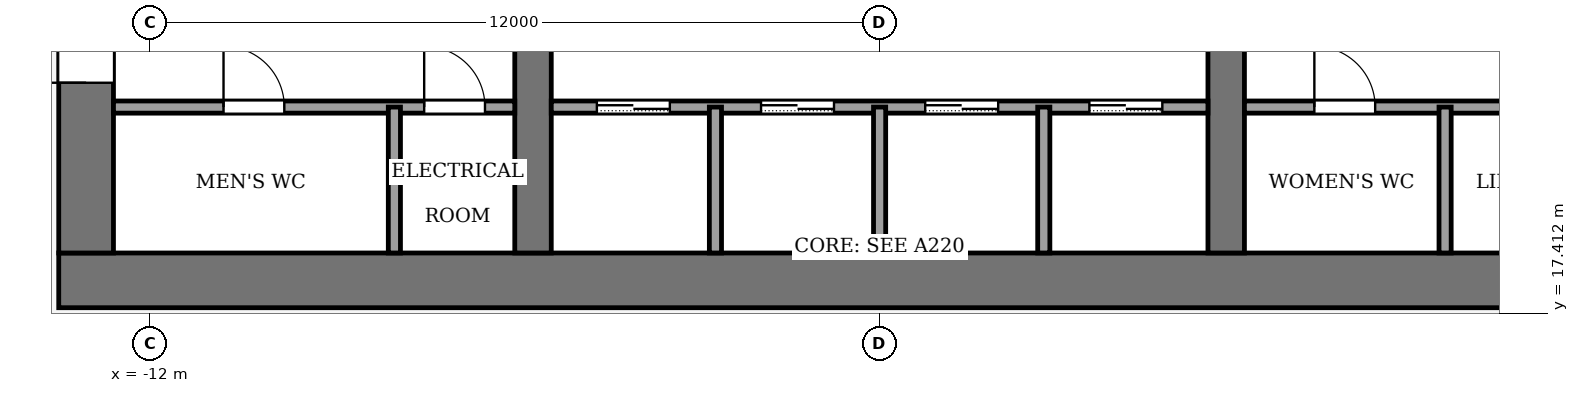
"""IFC4 building model, lengths in metres.
Left out: names, types, materials, properties, quantities, classifications, styles, units other than length and angle.
Written with IfcOpenShell. Run it as: python <this file> out.ifc"""

import sys

from ifc_helpers import new_model, si_unit, direction, frame, frame_2d, origin, place, context, subcontext, project, spatial, rectangle, extrude, element, fill, save


model = new_model("IFC4")
c1 = context("Model", 3, precision=1e-05, world=origin(), true_north=direction((0.0, 1.0)))
c2 = subcontext(c1, "Body", "Model", "MODEL_VIEW")
j1 = project(units=[si_unit("LENGTHUNIT", "METRE"), si_unit("PLANEANGLEUNIT", "RADIAN")], contexts=[c1])
p1 = place(None, origin())
s1 = spatial("IfcSite", under=j1, at=p1, CompositionType="ELEMENT")
p2 = place(p1, origin())
s2 = spatial("IfcBuilding", under=s1, at=p2, CompositionType="ELEMENT")
p3 = place(p2, frame((0.0, 0.0, 190.0)))
s3 = spatial("IfcBuildingStorey", under=s2, at=p3, CompositionType="ELEMENT", Elevation=190.0)
p4 = place(p3, frame((-13.5, 17.95, -0.13), z_axis=(0.0, 0.0, 1.0), x_axis=(1.0, 0.0, 0.0)))
e1 = element("IfcWall", 1, at=p4, inside=s3, PredefinedType="SHEAR", context=c2, shape_type="SweptSolid", body=[
    extrude(rectangle(XDim=27.0, YDim=0.9, at=frame_2d((13.5, 0.0))), origin(), (0.0, 0.0, 1.0), 4.0),
])
p5 = place(p3, frame((-13.05, 18.4, -0.13), z_axis=(0.0, 0.0, 1.0), x_axis=(0.0, 1.0, 0.0)))
e2 = element("IfcWall", 2, at=p5, inside=s3, PredefinedType="SHEAR", context=c2, shape_type="SweptSolid", body=[
    extrude(rectangle(XDim=19.2, YDim=0.9, at=frame_2d((9.6, 0.0))), origin(), (0.0, 0.0, 1.0), 4.0),
])
p6 = place(p5, frame((2.8, 0.0, 0.13)))
e3 = element("IfcOpeningElement", 3, at=p6, cuts=e2, PredefinedType="OPENING", context=c2, shape_type="SweptSolid", body=[
    extrude(rectangle(XDim=2.4, YDim=2.4, at=frame_2d((1.2, 1.2))), frame((0.0, 0.46, 0.0), z_axis=(0.0, -1.0, 0.0), x_axis=(1.0, 0.0, 0.0)), (0.0, 0.0, 1.0), 0.92),
])
p7 = place(p5, frame((13.4, 0.0, 0.13)))
e4 = element("IfcOpeningElement", 4, at=p7, cuts=e2, PredefinedType="OPENING", context=c2, shape_type="SweptSolid", body=[
    extrude(rectangle(XDim=1.4, YDim=2.2, at=frame_2d((0.7, 1.1))), frame((0.0, 0.46, 0.0), z_axis=(0.0, -1.0, 0.0), x_axis=(1.0, 0.0, 0.0)), (0.0, 0.0, 1.0), 0.92),
])
p8 = place(p3, frame((-5.7, 18.4, -0.13), z_axis=(0.0, 0.0, 1.0), x_axis=(0.0, 1.0, 0.0)))
e5 = element("IfcWall", 5, at=p8, inside=s3, PredefinedType="SHEAR", context=c2, shape_type="SweptSolid", body=[
    extrude(rectangle(XDim=19.2, YDim=0.6, at=frame_2d((9.6, 0.0))), origin(), (0.0, 0.0, 1.0), 4.0),
])
p9 = place(p8, frame((8.35, 0.0, 0.13)))
e6 = element("IfcOpeningElement", 6, at=p9, cuts=e5, PredefinedType="OPENING", context=c2, shape_type="SweptSolid", body=[
    extrude(rectangle(XDim=0.9, YDim=2.1, at=frame_2d((0.45, 1.05))), frame((0.0, 0.31, 0.0), z_axis=(0.0, -1.0, 0.0), x_axis=(1.0, 0.0, 0.0)), (0.0, 0.0, 1.0), 0.62),
])
p10 = place(p3, frame((5.7, 18.4, -0.13), z_axis=(0.0, 0.0, 1.0), x_axis=(0.0, 1.0, 0.0)))
e7 = element("IfcWall", 7, at=p10, inside=s3, PredefinedType="SHEAR", context=c2, shape_type="SweptSolid", body=[
    extrude(rectangle(XDim=19.2, YDim=0.6, at=frame_2d((9.6, 0.0))), origin(), (0.0, 0.0, 1.0), 4.0),
])
p11 = place(p10, frame((8.35, 0.0, 0.13)))
e8 = element("IfcOpeningElement", 8, at=p11, cuts=e7, PredefinedType="OPENING", context=c2, shape_type="SweptSolid", body=[
    extrude(rectangle(XDim=0.9, YDim=2.1, at=frame_2d((0.45, 1.05))), frame((0.0, 0.31, 0.0), z_axis=(0.0, -1.0, 0.0), x_axis=(1.0, 0.0, 0.0)), (0.0, 0.0, 1.0), 0.62),
])
p12 = place(p10, frame((13.3, 0.0, 0.13)))
e9 = element("IfcOpeningElement", 9, at=p12, cuts=e7, PredefinedType="OPENING", context=c2, shape_type="SweptSolid", body=[
    extrude(rectangle(XDim=2.4, YDim=2.4, at=frame_2d((1.2, 1.2))), frame((0.0, 0.31, 0.0), z_axis=(0.0, -1.0, 0.0), x_axis=(1.0, 0.0, 0.0)), (0.0, 0.0, 1.0), 0.62),
])
p13 = place(p3, frame((-12.6, 20.8, 0.0), z_axis=(0.0, 0.0, 1.0), x_axis=(1.0, 0.0, 0.0)))
e10 = element("IfcWall", 10, at=p13, inside=s3, PredefinedType="PARTITIONING", context=c2, shape_type="SweptSolid", body=[
    extrude(rectangle(XDim=6.6, YDim=0.2, at=frame_2d((3.3, 0.0))), origin(), (0.0, 0.0, 1.0), 3.87),
])
p14 = place(p13, frame((1.81, 0.0, 0.0)))
e11 = element("IfcOpeningElement", 11, at=p14, cuts=e10, PredefinedType="OPENING", context=c2, shape_type="SweptSolid", body=[
    extrude(rectangle(XDim=1.0, YDim=2.1, at=frame_2d((0.5, 1.05))), frame((0.0, 0.11, 0.0), z_axis=(0.0, -1.0, 0.0), x_axis=(1.0, 0.0, 0.0)), (0.0, 0.0, 1.0), 0.22),
])
p15 = place(p13, frame((5.11, 0.0, 0.0)))
e12 = element("IfcOpeningElement", 12, at=p15, cuts=e10, PredefinedType="OPENING", context=c2, shape_type="SweptSolid", body=[
    extrude(rectangle(XDim=1.0, YDim=2.1, at=frame_2d((0.5, 1.05))), frame((0.0, 0.11, 0.0), z_axis=(0.0, -1.0, 0.0), x_axis=(1.0, 0.0, 0.0)), (0.0, 0.0, 1.0), 0.22),
])
p16 = place(p3, frame((-5.4, 20.8, 0.0), z_axis=(0.0, 0.0, 1.0), x_axis=(1.0, 0.0, 0.0)))
e13 = element("IfcWall", 13, at=p16, inside=s3, PredefinedType="PARTITIONING", context=c2, shape_type="SweptSolid", body=[
    extrude(rectangle(XDim=10.8, YDim=0.2, at=frame_2d((5.4, 0.0))), origin(), (0.0, 0.0, 1.0), 3.87),
])
p17 = place(p16, frame((0.75, 0.0, 0.0)))
e14 = element("IfcOpeningElement", 14, at=p17, cuts=e13, PredefinedType="OPENING", context=c2, shape_type="SweptSolid", body=[
    extrude(rectangle(XDim=1.2, YDim=2.2, at=frame_2d((0.6, 1.1))), frame((0.0, 0.11, 0.0), z_axis=(0.0, -1.0, 0.0), x_axis=(1.0, 0.0, 0.0)), (0.0, 0.0, 1.0), 0.22),
])
p18 = place(p16, frame((3.45, 0.0, 0.0)))
e15 = element("IfcOpeningElement", 15, at=p18, cuts=e13, PredefinedType="OPENING", context=c2, shape_type="SweptSolid", body=[
    extrude(rectangle(XDim=1.2, YDim=2.2, at=frame_2d((0.6, 1.1))), frame((0.0, 0.11, 0.0), z_axis=(0.0, -1.0, 0.0), x_axis=(1.0, 0.0, 0.0)), (0.0, 0.0, 1.0), 0.22),
])
p19 = place(p16, frame((6.15, 0.0, 0.0)))
e16 = element("IfcOpeningElement", 16, at=p19, cuts=e13, PredefinedType="OPENING", context=c2, shape_type="SweptSolid", body=[
    extrude(rectangle(XDim=1.2, YDim=2.2, at=frame_2d((0.6, 1.1))), frame((0.0, 0.11, 0.0), z_axis=(0.0, -1.0, 0.0), x_axis=(1.0, 0.0, 0.0)), (0.0, 0.0, 1.0), 0.22),
])
p20 = place(p16, frame((8.85, 0.0, 0.0)))
e17 = element("IfcOpeningElement", 17, at=p20, cuts=e13, PredefinedType="OPENING", context=c2, shape_type="SweptSolid", body=[
    extrude(rectangle(XDim=1.2, YDim=2.2, at=frame_2d((0.6, 1.1))), frame((0.0, 0.11, 0.0), z_axis=(0.0, -1.0, 0.0), x_axis=(1.0, 0.0, 0.0)), (0.0, 0.0, 1.0), 0.22),
])
p21 = place(p3, frame((6.0, 20.8, 0.0), z_axis=(0.0, 0.0, 1.0), x_axis=(1.0, 0.0, 0.0)))
e18 = element("IfcWall", 18, at=p21, inside=s3, PredefinedType="PARTITIONING", context=c2, shape_type="SweptSolid", body=[
    extrude(rectangle(XDim=6.6, YDim=0.2, at=frame_2d((3.3, 0.0))), origin(), (0.0, 0.0, 1.0), 3.87),
])
p22 = place(p21, frame((1.15, 0.0, 0.0)))
e19 = element("IfcOpeningElement", 19, at=p22, cuts=e18, PredefinedType="OPENING", context=c2, shape_type="SweptSolid", body=[
    extrude(rectangle(XDim=1.0, YDim=2.1, at=frame_2d((0.5, 1.05))), frame((0.0, 0.11, 0.0), z_axis=(0.0, -1.0, 0.0), x_axis=(1.0, 0.0, 0.0)), (0.0, 0.0, 1.0), 0.22),
])
p23 = place(p21, frame((4.45, 0.0, 0.0)))
e20 = element("IfcOpeningElement", 20, at=p23, cuts=e18, PredefinedType="OPENING", context=c2, shape_type="SweptSolid", body=[
    extrude(rectangle(XDim=1.0, YDim=2.1, at=frame_2d((0.5, 1.05))), frame((0.0, 0.11, 0.0), z_axis=(0.0, -1.0, 0.0), x_axis=(1.0, 0.0, 0.0)), (0.0, 0.0, 1.0), 0.22),
])
for number, where, z_axis, x_axis in (
    (21, (-7.98, 18.4, 0.0), (0.0, 0.0, 1.0), (0.0, 1.0, 0.0)),
    (22, (-2.7, 18.4, 0.0), (0.0, 0.0, 1.0), (0.0, 1.0, 0.0)),
    (23, (0.0, 18.4, 0.0), (0.0, 0.0, 1.0), (0.0, 1.0, 0.0)),
    (24, (2.7, 18.4, 0.0), (0.0, 0.0, 1.0), (0.0, 1.0, 0.0)),
    (25, (9.3, 18.4, 0.0), (0.0, 0.0, 1.0), (0.0, 1.0, 0.0)),
):
    element("IfcWall", number, at=place(p3, frame(where, z_axis=z_axis, x_axis=x_axis)), inside=s3, PredefinedType="PARTITIONING", context=c2, shape_type="SweptSolid", body=[
        extrude(rectangle(XDim=2.4, YDim=0.2, at=frame_2d((1.2, 0.0))), origin(), (0.0, 0.0, 1.0), 3.87),
    ])
p24 = place(p17, origin())
e26 = element("IfcDoor", 26, at=p24, inside=s3, OperationType="SLIDING_TO_LEFT", PredefinedType="DOOR", context=c2, shape_type="SweptSolid", body=[
    extrude(rectangle(XDim=1.2, YDim=2.2, at=frame_2d((0.6, 1.1))), frame((0.0, 0.025, 0.0), z_axis=(0.0, -1.0, 0.0), x_axis=(1.0, 0.0, 0.0)), (0.0, 0.0, 1.0), 0.05),
])
fill(e14, e26)
p25 = place(p18, origin())
e27 = element("IfcDoor", 27, at=p25, inside=s3, OperationType="SLIDING_TO_LEFT", PredefinedType="DOOR", context=c2, shape_type="SweptSolid", body=[
    extrude(rectangle(XDim=1.2, YDim=2.2, at=frame_2d((0.6, 1.1))), frame((0.0, 0.025, 0.0), z_axis=(0.0, -1.0, 0.0), x_axis=(1.0, 0.0, 0.0)), (0.0, 0.0, 1.0), 0.05),
])
fill(e15, e27)
p26 = place(p19, origin())
e28 = element("IfcDoor", 28, at=p26, inside=s3, OperationType="SLIDING_TO_LEFT", PredefinedType="DOOR", context=c2, shape_type="SweptSolid", body=[
    extrude(rectangle(XDim=1.2, YDim=2.2, at=frame_2d((0.6, 1.1))), frame((0.0, 0.025, 0.0), z_axis=(0.0, -1.0, 0.0), x_axis=(1.0, 0.0, 0.0)), (0.0, 0.0, 1.0), 0.05),
])
fill(e16, e28)
p27 = place(p20, origin())
e29 = element("IfcDoor", 29, at=p27, inside=s3, OperationType="SLIDING_TO_LEFT", PredefinedType="DOOR", context=c2, shape_type="SweptSolid", body=[
    extrude(rectangle(XDim=1.2, YDim=2.2, at=frame_2d((0.6, 1.1))), frame((0.0, 0.025, 0.0), z_axis=(0.0, -1.0, 0.0), x_axis=(1.0, 0.0, 0.0)), (0.0, 0.0, 1.0), 0.05),
])
fill(e17, e29)
p28 = place(p14, origin())
e30 = element("IfcDoor", 30, at=p28, inside=s3, OperationType="SINGLE_SWING_LEFT", PredefinedType="DOOR", context=c2, shape_type="SweptSolid", body=[
    extrude(rectangle(XDim=1.0, YDim=2.1, at=frame_2d((0.5, 1.05))), frame((0.0, 0.025, 0.0), z_axis=(0.0, -1.0, 0.0), x_axis=(1.0, 0.0, 0.0)), (0.0, 0.0, 1.0), 0.05),
])
fill(e11, e30)
p29 = place(p15, origin())
e31 = element("IfcDoor", 31, at=p29, inside=s3, OperationType="SINGLE_SWING_LEFT", PredefinedType="DOOR", context=c2, shape_type="SweptSolid", body=[
    extrude(rectangle(XDim=1.0, YDim=2.1, at=frame_2d((0.5, 1.05))), frame((0.0, 0.025, 0.0), z_axis=(0.0, -1.0, 0.0), x_axis=(1.0, 0.0, 0.0)), (0.0, 0.0, 1.0), 0.05),
])
fill(e12, e31)
p30 = place(p22, origin())
e32 = element("IfcDoor", 32, at=p30, inside=s3, OperationType="SINGLE_SWING_LEFT", PredefinedType="DOOR", context=c2, shape_type="SweptSolid", body=[
    extrude(rectangle(XDim=1.0, YDim=2.1, at=frame_2d((0.5, 1.05))), frame((0.0, 0.025, 0.0), z_axis=(0.0, -1.0, 0.0), x_axis=(1.0, 0.0, 0.0)), (0.0, 0.0, 1.0), 0.05),
])
fill(e19, e32)
p31 = place(p6, origin())
e33 = element("IfcDoor", 33, at=p31, inside=s3, OperationType="DOUBLE_DOOR_SINGLE_SWING", PredefinedType="DOOR", context=c2, shape_type="SweptSolid", body=[
    extrude(rectangle(XDim=2.4, YDim=2.4, at=frame_2d((1.2, 1.2))), frame((0.0, 0.025, 0.0), z_axis=(0.0, -1.0, 0.0), x_axis=(1.0, 0.0, 0.0)), (0.0, 0.0, 1.0), 0.05),
])
fill(e3, e33)
save(model, sys.argv[1])
